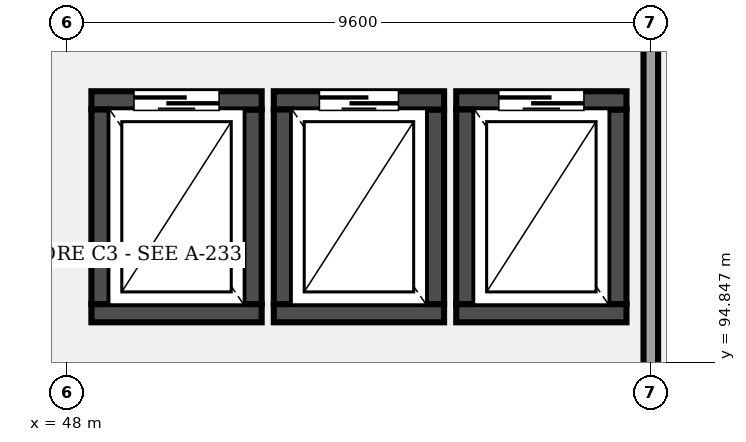
"""IFC4 building model, lengths in metres.
Left out: names, types, materials, properties, quantities, classifications, styles, units other than length and angle.
Written with IfcOpenShell. Run it as: python <this file> out.ifc"""

import sys

from ifc_helpers import new_model, si_unit, direction, frame, frame_2d, origin, place, context, subcontext, project, spatial, rectangle, extrude, element, fill, save


model = new_model("IFC4")
c1 = context("Model", 3, precision=1e-05, world=origin(), true_north=direction((0.0, 1.0)))
c2 = subcontext(c1, "Body", "Model", "MODEL_VIEW")
j1 = project(units=[si_unit("LENGTHUNIT", "METRE"), si_unit("PLANEANGLEUNIT", "RADIAN")], contexts=[c1])
p1 = place(None, origin())
s1 = spatial("IfcSite", under=j1, at=p1, CompositionType="ELEMENT")
p2 = place(p1, origin())
s2 = spatial("IfcBuilding", under=s1, at=p2, CompositionType="ELEMENT")
p3 = place(p2, frame((0.0, 0.0, 9.9)))
s3 = spatial("IfcBuildingStorey", under=s2, at=p3, CompositionType="ELEMENT", Elevation=9.9)
p4 = place(p3, frame((48.4, 95.65, 0.0), z_axis=(0.0, 0.0, 1.0), x_axis=(1.0, 0.0, 0.0)))
e1 = element("IfcWall", 1, at=p4, inside=s3, PredefinedType="SHEAR", context=c2, shape_type="SweptSolid", body=[
    extrude(rectangle(XDim=2.8, YDim=0.3, at=frame_2d((1.4, 0.0))), origin(), (0.0, 0.0, 1.0), 3.6),
])
p5 = place(p3, frame((51.05, 95.8, 0.0), z_axis=(0.0, 0.0, 1.0), x_axis=(0.0, 1.0, 0.0)))
e2 = element("IfcWall", 2, at=p5, inside=s3, PredefinedType="SHEAR", context=c2, shape_type="SweptSolid", body=[
    extrude(rectangle(XDim=3.2, YDim=0.3, at=frame_2d((1.6, 0.0))), origin(), (0.0, 0.0, 1.0), 3.6),
])
p6 = place(p3, frame((51.2, 99.15, 0.0), z_axis=(0.0, 0.0, 1.0), x_axis=(-1.0, 0.0, 0.0)))
e3 = element("IfcWall", 3, at=p6, inside=s3, PredefinedType="SHEAR", context=c2, shape_type="SweptSolid", body=[
    extrude(rectangle(XDim=2.8, YDim=0.3, at=frame_2d((1.4, 0.0))), origin(), (0.0, 0.0, 1.0), 3.6),
])
p7 = place(p6, frame((0.7, 0.0, 0.0)))
e4 = element("IfcOpeningElement", 4, at=p7, cuts=e3, PredefinedType="OPENING", context=c2, shape_type="SweptSolid", body=[
    extrude(rectangle(XDim=1.4, YDim=2.3, at=frame_2d((0.7, 1.15))), frame((0.0, 0.16, 0.0), z_axis=(0.0, -1.0, 0.0), x_axis=(1.0, 0.0, 0.0)), (0.0, 0.0, 1.0), 0.32),
])
p8 = place(p3, frame((48.55, 99.0, 0.0), z_axis=(0.0, 0.0, 1.0), x_axis=(0.0, -1.0, 0.0)))
e5 = element("IfcWall", 5, at=p8, inside=s3, PredefinedType="SHEAR", context=c2, shape_type="SweptSolid", body=[
    extrude(rectangle(XDim=3.2, YDim=0.3, at=frame_2d((1.6, 0.0))), origin(), (0.0, 0.0, 1.0), 3.6),
])
p9 = place(p3, frame((51.4, 95.65, 0.0), z_axis=(0.0, 0.0, 1.0), x_axis=(1.0, 0.0, 0.0)))
e6 = element("IfcWall", 6, at=p9, inside=s3, PredefinedType="SHEAR", context=c2, shape_type="SweptSolid", body=[
    extrude(rectangle(XDim=2.8, YDim=0.3, at=frame_2d((1.4, 0.0))), origin(), (0.0, 0.0, 1.0), 3.6),
])
p10 = place(p3, frame((54.05, 95.8, 0.0), z_axis=(0.0, 0.0, 1.0), x_axis=(0.0, 1.0, 0.0)))
e7 = element("IfcWall", 7, at=p10, inside=s3, PredefinedType="SHEAR", context=c2, shape_type="SweptSolid", body=[
    extrude(rectangle(XDim=3.2, YDim=0.3, at=frame_2d((1.6, 0.0))), origin(), (0.0, 0.0, 1.0), 3.6),
])
p11 = place(p3, frame((54.2, 99.15, 0.0), z_axis=(0.0, 0.0, 1.0), x_axis=(-1.0, 0.0, 0.0)))
e8 = element("IfcWall", 8, at=p11, inside=s3, PredefinedType="SHEAR", context=c2, shape_type="SweptSolid", body=[
    extrude(rectangle(XDim=2.8, YDim=0.3, at=frame_2d((1.4, 0.0))), origin(), (0.0, 0.0, 1.0), 3.6),
])
p12 = place(p11, frame((0.75, 0.0, 0.0)))
e9 = element("IfcOpeningElement", 9, at=p12, cuts=e8, PredefinedType="OPENING", context=c2, shape_type="SweptSolid", body=[
    extrude(rectangle(XDim=1.3, YDim=2.3, at=frame_2d((0.65, 1.15))), frame((0.0, 0.16, 0.0), z_axis=(0.0, -1.0, 0.0), x_axis=(1.0, 0.0, 0.0)), (0.0, 0.0, 1.0), 0.32),
])
p13 = place(p3, frame((51.55, 99.0, 0.0), z_axis=(0.0, 0.0, 1.0), x_axis=(0.0, -1.0, 0.0)))
e10 = element("IfcWall", 10, at=p13, inside=s3, PredefinedType="SHEAR", context=c2, shape_type="SweptSolid", body=[
    extrude(rectangle(XDim=3.2, YDim=0.3, at=frame_2d((1.6, 0.0))), origin(), (0.0, 0.0, 1.0), 3.6),
])
p14 = place(p3, frame((54.4, 95.65, 0.0), z_axis=(0.0, 0.0, 1.0), x_axis=(1.0, 0.0, 0.0)))
e11 = element("IfcWall", 11, at=p14, inside=s3, PredefinedType="SHEAR", context=c2, shape_type="SweptSolid", body=[
    extrude(rectangle(XDim=2.8, YDim=0.3, at=frame_2d((1.4, 0.0))), origin(), (0.0, 0.0, 1.0), 3.6),
])
p15 = place(p3, frame((57.05, 95.8, 0.0), z_axis=(0.0, 0.0, 1.0), x_axis=(0.0, 1.0, 0.0)))
e12 = element("IfcWall", 12, at=p15, inside=s3, PredefinedType="SHEAR", context=c2, shape_type="SweptSolid", body=[
    extrude(rectangle(XDim=3.2, YDim=0.3, at=frame_2d((1.6, 0.0))), origin(), (0.0, 0.0, 1.0), 3.6),
])
p16 = place(p3, frame((57.2, 99.15, 0.0), z_axis=(0.0, 0.0, 1.0), x_axis=(-1.0, 0.0, 0.0)))
e13 = element("IfcWall", 13, at=p16, inside=s3, PredefinedType="SHEAR", context=c2, shape_type="SweptSolid", body=[
    extrude(rectangle(XDim=2.8, YDim=0.3, at=frame_2d((1.4, 0.0))), origin(), (0.0, 0.0, 1.0), 3.6),
])
p17 = place(p16, frame((0.7, 0.0, 0.0)))
e14 = element("IfcOpeningElement", 14, at=p17, cuts=e13, PredefinedType="OPENING", context=c2, shape_type="SweptSolid", body=[
    extrude(rectangle(XDim=1.4, YDim=2.3, at=frame_2d((0.7, 1.15))), frame((0.0, 0.16, 0.0), z_axis=(0.0, -1.0, 0.0), x_axis=(1.0, 0.0, 0.0)), (0.0, 0.0, 1.0), 0.32),
])
p18 = place(p3, frame((54.55, 99.0, 0.0), z_axis=(0.0, 0.0, 1.0), x_axis=(0.0, -1.0, 0.0)))
e15 = element("IfcWall", 15, at=p18, inside=s3, PredefinedType="SHEAR", context=c2, shape_type="SweptSolid", body=[
    extrude(rectangle(XDim=3.2, YDim=0.3, at=frame_2d((1.6, 0.0))), origin(), (0.0, 0.0, 1.0), 3.6),
])
p19 = place(p3, frame((57.6, 88.4, 0.0), z_axis=(0.0, 0.0, 1.0), x_axis=(0.0, 1.0, 0.0)))
e16 = element("IfcWall", 16, at=p19, inside=s3, PredefinedType="PARTITIONING", context=c2, shape_type="SweptSolid", body=[
    extrude(rectangle(XDim=13.45, YDim=0.24, at=frame_2d((6.725, 0.0))), origin(), (0.0, 0.0, 1.0), 2.48),
])
p20 = place(p7, origin())
e17 = element("IfcDoor", 17, at=p20, inside=s3, OperationType="SLIDING_TO_RIGHT", PredefinedType="DOOR", context=c2, shape_type="SweptSolid", body=[
    extrude(rectangle(XDim=1.4, YDim=2.3, at=frame_2d((0.7, 1.15))), frame((0.0, 0.025, 0.0), z_axis=(0.0, -1.0, 0.0), x_axis=(1.0, 0.0, 0.0)), (0.0, 0.0, 1.0), 0.05),
])
fill(e4, e17)
p21 = place(p12, origin())
e18 = element("IfcDoor", 18, at=p21, inside=s3, OperationType="SLIDING_TO_RIGHT", PredefinedType="DOOR", context=c2, shape_type="SweptSolid", body=[
    extrude(rectangle(XDim=1.3, YDim=2.3, at=frame_2d((0.65, 1.15))), frame((0.0, 0.025, 0.0), z_axis=(0.0, -1.0, 0.0), x_axis=(1.0, 0.0, 0.0)), (0.0, 0.0, 1.0), 0.05),
])
fill(e9, e18)
p22 = place(p17, origin())
e19 = element("IfcDoor", 19, at=p22, inside=s3, OperationType="SLIDING_TO_RIGHT", PredefinedType="DOOR", context=c2, shape_type="SweptSolid", body=[
    extrude(rectangle(XDim=1.4, YDim=2.3, at=frame_2d((0.7, 1.15))), frame((0.0, 0.025, 0.0), z_axis=(0.0, -1.0, 0.0), x_axis=(1.0, 0.0, 0.0)), (0.0, 0.0, 1.0), 0.05),
])
fill(e14, e19)
save(model, sys.argv[1])
